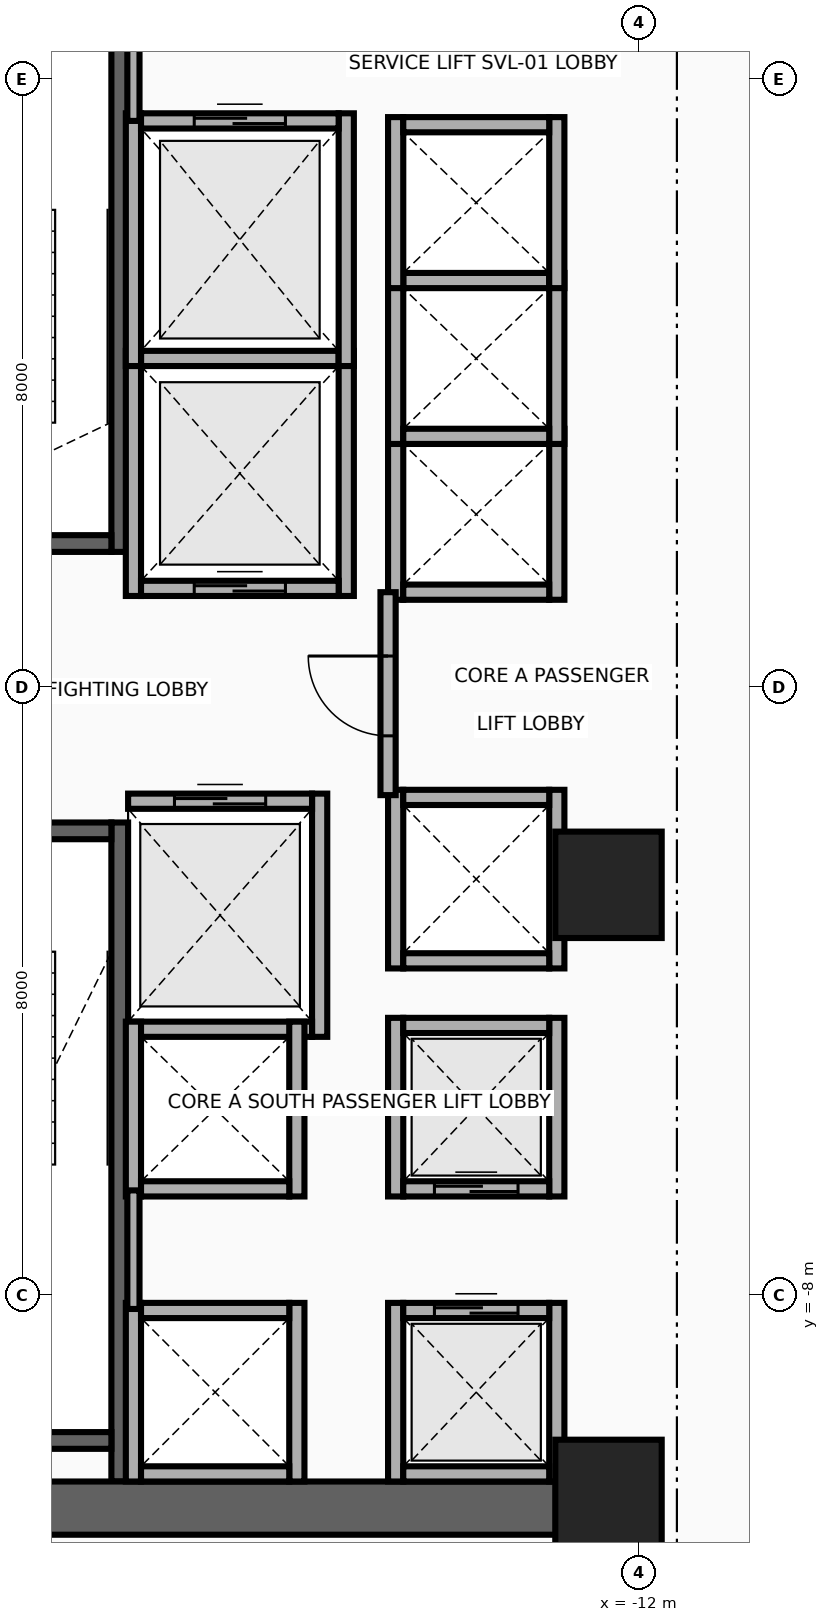
"""IFC4 building model, lengths in metres.
Left out: names, types, materials, properties, quantities, classifications, styles, units other than length and angle.
Written with IfcOpenShell. Run it as: python <this file> out.ifc"""

import sys

from ifc_helpers import new_model, si_unit, direction, frame, frame_2d, origin, origin_2d, place, context, subcontext, project, spatial, rectangle, extrude, source, transform, mapped, element, fill, save


model = new_model("IFC4")
c1 = context("Model", 3, precision=1e-05, world=origin(), true_north=direction((0.0, 1.0)))
c2 = subcontext(c1, "Body", "Model", "MODEL_VIEW")
j1 = project(units=[si_unit("LENGTHUNIT", "METRE"), si_unit("PLANEANGLEUNIT", "RADIAN")], contexts=[c1])
p1 = place(None, origin())
s1 = spatial("IfcSite", under=j1, at=p1, CompositionType="ELEMENT")
p2 = place(p1, origin())
s2 = spatial("IfcBuilding", under=s1, at=p2, CompositionType="ELEMENT")
p3 = place(p2, frame((0.0, 0.0, 40.8)))
s3 = spatial("IfcBuildingStorey", under=s2, at=p3, CompositionType="ELEMENT", Elevation=40.8)
p4 = place(p3, frame((-18.83, 1.78, 0.0), z_axis=(0.0, 0.0, 1.0), x_axis=(0.0, 1.0, 0.0)))
e1 = element("IfcWall", 1, at=p4, inside=s3, PredefinedType="SHEAR", context=c2, shape_type="SweptSolid", body=[
    extrude(rectangle(XDim=8.67, YDim=0.22, at=frame_2d((4.335, 0.0))), origin(), (0.0, 0.0, 1.0), 3.46),
])
p5 = place(p3, frame((-22.05, 1.89, 0.0), z_axis=(0.0, 0.0, 1.0), x_axis=(1.0, 0.0, 0.0)))
e2 = element("IfcWall", 2, at=p5, inside=s3, PredefinedType="SHEAR", context=c2, shape_type="SweptSolid", body=[
    extrude(rectangle(XDim=3.11, YDim=0.22, at=frame_2d((1.555, 0.0))), origin(), (0.0, 0.0, 1.0), 3.46),
])
p6 = place(p5, frame((1.0, 0.0, 0.0)))
e3 = element("IfcOpeningElement", 3, at=p6, cuts=e2, PredefinedType="OPENING", context=c2, shape_type="SweptSolid", body=[
    extrude(rectangle(XDim=1.1, YDim=2.15, at=frame_2d((0.55, 1.075))), frame((0.0, 0.125, 0.0), z_axis=(0.0, -1.0, 0.0), x_axis=(1.0, 0.0, 0.0)), (0.0, 0.0, 1.0), 0.25),
])
p7 = place(p3, frame((-18.83, -10.45, 0.0), z_axis=(0.0, 0.0, 1.0), x_axis=(0.0, 1.0, 0.0)))
e4 = element("IfcWall", 4, at=p7, inside=s3, PredefinedType="SHEAR", context=c2, shape_type="SweptSolid", body=[
    extrude(rectangle(XDim=8.67, YDim=0.22, at=frame_2d((4.335, 0.0))), origin(), (0.0, 0.0, 1.0), 3.46),
])
p8 = place(p3, frame((-22.05, -9.91, 0.0), z_axis=(0.0, 0.0, 1.0), x_axis=(1.0, 0.0, 0.0)))
e5 = element("IfcWall", 5, at=p8, inside=s3, PredefinedType="SHEAR", context=c2, shape_type="SweptSolid", body=[
    extrude(rectangle(XDim=3.11, YDim=0.22, at=frame_2d((1.555, 0.0))), origin(), (0.0, 0.0, 1.0), 3.46),
])
p9 = place(p3, frame((-22.05, -1.89, 0.0), z_axis=(0.0, 0.0, 1.0), x_axis=(1.0, 0.0, 0.0)))
e6 = element("IfcWall", 6, at=p9, inside=s3, PredefinedType="SHEAR", context=c2, shape_type="SweptSolid", body=[
    extrude(rectangle(XDim=3.11, YDim=0.22, at=frame_2d((1.555, 0.0))), origin(), (0.0, 0.0, 1.0), 3.46),
])
p10 = place(p9, frame((1.0, 0.0, 0.0)))
e7 = element("IfcOpeningElement", 7, at=p10, cuts=e6, PredefinedType="OPENING", context=c2, shape_type="SweptSolid", body=[
    extrude(rectangle(XDim=1.1, YDim=2.15, at=frame_2d((0.55, 1.075))), frame((0.0, 0.125, 0.0), z_axis=(0.0, -1.0, 0.0), x_axis=(1.0, 0.0, 0.0)), (0.0, 0.0, 1.0), 0.25),
])
p11 = place(p3, frame((-22.65, -10.8, 0.0), z_axis=(0.0, 0.0, 1.0), x_axis=(1.0, 0.0, 0.0)))
e8 = element("IfcWall", 8, at=p11, inside=s3, PredefinedType="SHEAR", context=c2, shape_type="SweptSolid", body=[
    extrude(rectangle(XDim=10.25, YDim=0.7, at=frame_2d((5.125, 0.0))), origin(), (0.0, 0.0, 1.0), 3.46),
])
m1 = source(origin(), c2, "Body", "SweptSolid", [
    extrude(rectangle(XDim=1.4, YDim=1.4, at=origin_2d()), origin(), (0.0, 0.0, 1.0), 3.7),
])
for number, where, z_axis, x_axis in (
    (9, (-12.4, -10.6, 0.0), (0.0, 0.0, 1.0), (1.0, 0.0, 0.0)),
    (10, (-12.4, -2.6, 0.0), (0.0, 0.0, 1.0), (1.0, 0.0, 0.0)),
):
    element("IfcColumn", number, at=place(p3, frame(where, z_axis=z_axis, x_axis=x_axis)), inside=s3, PredefinedType="COLUMN", context=c2, shape_type="MappedRepresentation", body=[
        mapped(m1, transform((0.0, 0.0, 0.0), x_axis=(1.0, 0.0, 0.0), y_axis=(0.0, 1.0, 0.0), z_axis=(0.0, 0.0, 1.0), scale=1.0)),
    ])
for number, where, z_axis, x_axis in (
    (11, (-18.65, 1.2, 0.0), (0.0, 0.0, 1.0), (0.0, 1.0, 0.0)),
    (12, (-15.85, 1.2, 0.0), (0.0, 0.0, 1.0), (0.0, 1.0, 0.0)),
):
    element("IfcWall", number, at=place(p3, frame(where, z_axis=z_axis, x_axis=x_axis)), inside=s3, PredefinedType="MOVABLE", context=c2, shape_type="SweptSolid", body=[
        extrude(rectangle(XDim=3.225, YDim=0.2, at=frame_2d((1.613, 0.0))), origin(), (0.0, 0.0, 1.0), 3.46),
    ])
p12 = place(p3, frame((-18.55, 1.3, 0.0), z_axis=(0.0, 0.0, 1.0), x_axis=(1.0, 0.0, 0.0)))
e13 = element("IfcWall", 13, at=p12, inside=s3, PredefinedType="MOVABLE", context=c2, shape_type="SweptSolid", body=[
    extrude(rectangle(XDim=2.6, YDim=0.2, at=frame_2d((1.3, 0.0))), origin(), (0.0, 0.0, 1.0), 3.46),
])
p13 = place(p12, frame((0.7, 0.0, 0.0)))
e14 = element("IfcOpeningElement", 14, at=p13, cuts=e13, PredefinedType="OPENING", context=c2, shape_type="SweptSolid", body=[
    extrude(rectangle(XDim=1.2, YDim=2.1, at=frame_2d((0.6, 1.05))), frame((0.0, 0.115, 0.0), z_axis=(0.0, -1.0, 0.0), x_axis=(1.0, 0.0, 0.0)), (0.0, 0.0, 1.0), 0.23),
])
p14 = place(p3, frame((-18.55, 4.325, 0.0), z_axis=(0.0, 0.0, 1.0), x_axis=(1.0, 0.0, 0.0)))
e15 = element("IfcWall", 15, at=p14, inside=s3, PredefinedType="MOVABLE", context=c2, shape_type="SweptSolid", body=[
    extrude(rectangle(XDim=2.6, YDim=0.2, at=frame_2d((1.3, 0.0))), origin(), (0.0, 0.0, 1.0), 3.46),
])
p15 = place(p3, frame((-16.2, -4.6, 0.0), z_axis=(0.0, 0.0, 1.0), x_axis=(0.0, 1.0, 0.0)))
e16 = element("IfcWall", 16, at=p15, inside=s3, PredefinedType="MOVABLE", context=c2, shape_type="SweptSolid", body=[
    extrude(rectangle(XDim=3.2, YDim=0.2, at=frame_2d((1.6, 0.0))), origin(), (0.0, 0.0, 1.0), 3.46),
])
p16 = place(p3, frame((-18.72, -4.5, 0.0), z_axis=(0.0, 0.0, 1.0), x_axis=(1.0, 0.0, 0.0)))
e17 = element("IfcWall", 17, at=p16, inside=s3, PredefinedType="MOVABLE", context=c2, shape_type="SweptSolid", body=[
    extrude(rectangle(XDim=2.42, YDim=0.2, at=frame_2d((1.21, 0.0))), origin(), (0.0, 0.0, 1.0), 3.46),
])
p17 = place(p3, frame((-18.72, -1.5, 0.0), z_axis=(0.0, 0.0, 1.0), x_axis=(1.0, 0.0, 0.0)))
e18 = element("IfcWall", 18, at=p17, inside=s3, PredefinedType="MOVABLE", context=c2, shape_type="SweptSolid", body=[
    extrude(rectangle(XDim=2.42, YDim=0.2, at=frame_2d((1.21, 0.0))), origin(), (0.0, 0.0, 1.0), 3.46),
])
p18 = place(p17, frame((0.61, 0.0, 0.0)))
e19 = element("IfcOpeningElement", 19, at=p18, cuts=e18, PredefinedType="OPENING", context=c2, shape_type="SweptSolid", body=[
    extrude(rectangle(XDim=1.2, YDim=2.1, at=frame_2d((0.6, 1.05))), frame((0.0, 0.115, 0.0), z_axis=(0.0, -1.0, 0.0), x_axis=(1.0, 0.0, 0.0)), (0.0, 0.0, 1.0), 0.23),
])
for number, where, z_axis, x_axis in (
    (20, (-18.65, 4.225, 0.0), (0.0, 0.0, 1.0), (0.0, 1.0, 0.0)),
    (21, (-15.85, 4.225, 0.0), (0.0, 0.0, 1.0), (0.0, 1.0, 0.0)),
):
    element("IfcWall", number, at=place(p3, frame(where, z_axis=z_axis, x_axis=x_axis)), inside=s3, PredefinedType="MOVABLE", context=c2, shape_type="SweptSolid", body=[
        extrude(rectangle(XDim=3.325, YDim=0.2, at=frame_2d((1.663, 0.0))), origin(), (0.0, 0.0, 1.0), 3.46),
    ])
p19 = place(p3, frame((-18.55, 7.45, 0.0), z_axis=(0.0, 0.0, 1.0), x_axis=(1.0, 0.0, 0.0)))
e22 = element("IfcWall", 22, at=p19, inside=s3, PredefinedType="MOVABLE", context=c2, shape_type="SweptSolid", body=[
    extrude(rectangle(XDim=2.6, YDim=0.2, at=frame_2d((1.3, 0.0))), origin(), (0.0, 0.0, 1.0), 3.46),
])
p20 = place(p19, frame((0.7, 0.0, 0.0)))
e23 = element("IfcOpeningElement", 23, at=p20, cuts=e22, PredefinedType="OPENING", context=c2, shape_type="SweptSolid", body=[
    extrude(rectangle(XDim=1.2, YDim=2.1, at=frame_2d((0.6, 1.05))), frame((0.0, 0.115, 0.0), z_axis=(0.0, -1.0, 0.0), x_axis=(1.0, 0.0, 0.0)), (0.0, 0.0, 1.0), 0.23),
])
for number, where, z_axis, x_axis in (
    (24, (-15.2, -10.45, 0.0), (0.0, 0.0, 1.0), (0.0, 1.0, 0.0)),
    (25, (-13.08, -10.45, 0.0), (0.0, 0.0, 1.0), (0.0, 1.0, 0.0)),
):
    element("IfcWall", number, at=place(p3, frame(where, z_axis=z_axis, x_axis=x_axis)), inside=s3, PredefinedType="MOVABLE", context=c2, shape_type="SweptSolid", body=[
        extrude(rectangle(XDim=2.35, YDim=0.2, at=frame_2d((1.175, 0.0))), origin(), (0.0, 0.0, 1.0), 2.583),
    ])
p21 = place(p3, frame((-15.1, -10.35, 0.0), z_axis=(0.0, 0.0, 1.0), x_axis=(1.0, 0.0, 0.0)))
e26 = element("IfcWall", 26, at=p21, inside=s3, PredefinedType="MOVABLE", context=c2, shape_type="SweptSolid", body=[
    extrude(rectangle(XDim=1.92, YDim=0.2, at=frame_2d((0.96, 0.0))), origin(), (0.0, 0.0, 1.0), 2.583),
])
p22 = place(p3, frame((-15.1, -8.2, 0.0), z_axis=(0.0, 0.0, 1.0), x_axis=(1.0, 0.0, 0.0)))
e27 = element("IfcWall", 27, at=p22, inside=s3, PredefinedType="MOVABLE", context=c2, shape_type="SweptSolid", body=[
    extrude(rectangle(XDim=1.92, YDim=0.2, at=frame_2d((0.96, 0.0))), origin(), (0.0, 0.0, 1.0), 3.46),
])
p23 = place(p22, frame((0.41, 0.0, 0.0)))
e28 = element("IfcOpeningElement", 28, at=p23, cuts=e27, PredefinedType="OPENING", context=c2, shape_type="SweptSolid", body=[
    extrude(rectangle(XDim=1.1, YDim=2.1, at=frame_2d((0.55, 1.05))), frame((0.0, 0.115, 0.0), z_axis=(0.0, -1.0, 0.0), x_axis=(1.0, 0.0, 0.0)), (0.0, 0.0, 1.0), 0.23),
])
for number, where, z_axis, x_axis in (
    (29, (-15.2, -6.7, 0.0), (0.0, 0.0, 1.0), (0.0, 1.0, 0.0)),
    (30, (-13.08, -6.7, 0.0), (0.0, 0.0, 1.0), (0.0, 1.0, 0.0)),
):
    element("IfcWall", number, at=place(p3, frame(where, z_axis=z_axis, x_axis=x_axis)), inside=s3, PredefinedType="MOVABLE", context=c2, shape_type="SweptSolid", body=[
        extrude(rectangle(XDim=2.35, YDim=0.2, at=frame_2d((1.175, 0.0))), origin(), (0.0, 0.0, 1.0), 3.46),
    ])
p24 = place(p3, frame((-15.1, -6.6, 0.0), z_axis=(0.0, 0.0, 1.0), x_axis=(1.0, 0.0, 0.0)))
e31 = element("IfcWall", 31, at=p24, inside=s3, PredefinedType="MOVABLE", context=c2, shape_type="SweptSolid", body=[
    extrude(rectangle(XDim=1.92, YDim=0.2, at=frame_2d((0.96, 0.0))), origin(), (0.0, 0.0, 1.0), 3.46),
])
p25 = place(p24, frame((0.41, 0.0, 0.0)))
e32 = element("IfcOpeningElement", 32, at=p25, cuts=e31, PredefinedType="OPENING", context=c2, shape_type="SweptSolid", body=[
    extrude(rectangle(XDim=1.1, YDim=2.1, at=frame_2d((0.55, 1.05))), frame((0.0, 0.115, 0.0), z_axis=(0.0, -1.0, 0.0), x_axis=(1.0, 0.0, 0.0)), (0.0, 0.0, 1.0), 0.23),
])
p26 = place(p3, frame((-15.1, -4.45, 0.0), z_axis=(0.0, 0.0, 1.0), x_axis=(1.0, 0.0, 0.0)))
e33 = element("IfcWall", 33, at=p26, inside=s3, PredefinedType="MOVABLE", context=c2, shape_type="SweptSolid", body=[
    extrude(rectangle(XDim=1.92, YDim=0.2, at=frame_2d((0.96, 0.0))), origin(), (0.0, 0.0, 1.0), 3.46),
])
for number, where, z_axis, x_axis in (
    (34, (-18.65, -10.45, 0.0), (0.0, 0.0, 1.0), (0.0, 1.0, 0.0)),
    (35, (-16.5, -10.45, 0.0), (0.0, 0.0, 1.0), (0.0, 1.0, 0.0)),
):
    element("IfcWall", number, at=place(p3, frame(where, z_axis=z_axis, x_axis=x_axis)), inside=s3, PredefinedType="MOVABLE", context=c2, shape_type="SweptSolid", body=[
        extrude(rectangle(XDim=2.35, YDim=0.2, at=frame_2d((1.175, 0.0))), origin(), (0.0, 0.0, 1.0), 2.583),
    ])
p27 = place(p3, frame((-18.55, -10.35, 0.0), z_axis=(0.0, 0.0, 1.0), x_axis=(1.0, 0.0, 0.0)))
e36 = element("IfcWall", 36, at=p27, inside=s3, PredefinedType="MOVABLE", context=c2, shape_type="SweptSolid", body=[
    extrude(rectangle(XDim=1.95, YDim=0.2, at=frame_2d((0.975, 0.0))), origin(), (0.0, 0.0, 1.0), 2.583),
])
p28 = place(p3, frame((-18.55, -8.2, 0.0), z_axis=(0.0, 0.0, 1.0), x_axis=(1.0, 0.0, 0.0)))
e37 = element("IfcWall", 37, at=p28, inside=s3, PredefinedType="MOVABLE", context=c2, shape_type="SweptSolid", body=[
    extrude(rectangle(XDim=1.95, YDim=0.2, at=frame_2d((0.975, 0.0))), origin(), (0.0, 0.0, 1.0), 3.46),
])
for number, where, z_axis, x_axis in (
    (38, (-15.2, 1.15, 0.0), (0.0, 0.0, 1.0), (0.0, 1.0, 0.0)),
    (39, (-13.08, 1.15, 0.0), (0.0, 0.0, 1.0), (0.0, 1.0, 0.0)),
):
    element("IfcWall", number, at=place(p3, frame(where, z_axis=z_axis, x_axis=x_axis)), inside=s3, PredefinedType="MOVABLE", context=c2, shape_type="SweptSolid", body=[
        extrude(rectangle(XDim=2.25, YDim=0.2, at=frame_2d((1.125, 0.0))), origin(), (0.0, 0.0, 1.0), 3.46),
    ])
p29 = place(p3, frame((-15.1, 1.25, 0.0), z_axis=(0.0, 0.0, 1.0), x_axis=(1.0, 0.0, 0.0)))
e40 = element("IfcWall", 40, at=p29, inside=s3, PredefinedType="MOVABLE", context=c2, shape_type="SweptSolid", body=[
    extrude(rectangle(XDim=1.92, YDim=0.2, at=frame_2d((0.96, 0.0))), origin(), (0.0, 0.0, 1.0), 3.46),
])
for number, where, z_axis, x_axis in (
    (41, (-15.2, 3.2, 0.0), (0.0, 0.0, 1.0), (0.0, 1.0, 0.0)),
    (42, (-13.08, 3.2, 0.0), (0.0, 0.0, 1.0), (0.0, 1.0, 0.0)),
):
    element("IfcWall", number, at=place(p3, frame(where, z_axis=z_axis, x_axis=x_axis)), inside=s3, PredefinedType="MOVABLE", context=c2, shape_type="SweptSolid", body=[
        extrude(rectangle(XDim=2.25, YDim=0.2, at=frame_2d((1.125, 0.0))), origin(), (0.0, 0.0, 1.0), 3.46),
    ])
for number, where, z_axis, x_axis in (
    (43, (-15.1, 3.3, 0.0), (0.0, 0.0, 1.0), (1.0, 0.0, 0.0)),
    (44, (-15.1, 5.35, 0.0), (0.0, 0.0, 1.0), (1.0, 0.0, 0.0)),
):
    element("IfcWall", number, at=place(p3, frame(where, z_axis=z_axis, x_axis=x_axis)), inside=s3, PredefinedType="MOVABLE", context=c2, shape_type="SweptSolid", body=[
        extrude(rectangle(XDim=1.92, YDim=0.2, at=frame_2d((0.96, 0.0))), origin(), (0.0, 0.0, 1.0), 3.46),
    ])
for number, where, z_axis, x_axis in (
    (45, (-15.2, 5.25, 0.0), (0.0, 0.0, 1.0), (0.0, 1.0, 0.0)),
    (46, (-13.08, 5.25, 0.0), (0.0, 0.0, 1.0), (0.0, 1.0, 0.0)),
):
    element("IfcWall", number, at=place(p3, frame(where, z_axis=z_axis, x_axis=x_axis)), inside=s3, PredefinedType="MOVABLE", context=c2, shape_type="SweptSolid", body=[
        extrude(rectangle(XDim=2.25, YDim=0.2, at=frame_2d((1.125, 0.0))), origin(), (0.0, 0.0, 1.0), 3.46),
    ])
p30 = place(p3, frame((-15.1, 7.4, 0.0), z_axis=(0.0, 0.0, 1.0), x_axis=(1.0, 0.0, 0.0)))
e47 = element("IfcWall", 47, at=p30, inside=s3, PredefinedType="MOVABLE", context=c2, shape_type="SweptSolid", body=[
    extrude(rectangle(XDim=1.92, YDim=0.2, at=frame_2d((0.96, 0.0))), origin(), (0.0, 0.0, 1.0), 3.46),
])
for number, where, z_axis, x_axis in (
    (48, (-18.65, -6.7, 0.0), (0.0, 0.0, 1.0), (0.0, 1.0, 0.0)),
    (49, (-16.5, -6.7, 0.0), (0.0, 0.0, 1.0), (0.0, 1.0, 0.0)),
):
    element("IfcWall", number, at=place(p3, frame(where, z_axis=z_axis, x_axis=x_axis)), inside=s3, PredefinedType="MOVABLE", context=c2, shape_type="SweptSolid", body=[
        extrude(rectangle(XDim=2.3, YDim=0.2, at=frame_2d((1.15, 0.0))), origin(), (0.0, 0.0, 1.0), 3.46),
    ])
p31 = place(p3, frame((-18.55, -6.6, 0.0), z_axis=(0.0, 0.0, 1.0), x_axis=(1.0, 0.0, 0.0)))
e50 = element("IfcWall", 50, at=p31, inside=s3, PredefinedType="MOVABLE", context=c2, shape_type="SweptSolid", body=[
    extrude(rectangle(XDim=1.95, YDim=0.2, at=frame_2d((0.975, 0.0))), origin(), (0.0, 0.0, 1.0), 3.46),
])
for number, where, z_axis, x_axis in (
    (51, (-15.2, -3.7, 0.0), (0.0, 0.0, 1.0), (0.0, 1.0, 0.0)),
    (52, (-13.08, -3.7, 0.0), (0.0, 0.0, 1.0), (0.0, 1.0, 0.0)),
):
    element("IfcWall", number, at=place(p3, frame(where, z_axis=z_axis, x_axis=x_axis)), inside=s3, PredefinedType="MOVABLE", context=c2, shape_type="SweptSolid", body=[
        extrude(rectangle(XDim=2.35, YDim=0.2, at=frame_2d((1.175, 0.0))), origin(), (0.0, 0.0, 1.0), 3.46),
    ])
for number, where, z_axis, x_axis in (
    (53, (-15.1, -3.6, 0.0), (0.0, 0.0, 1.0), (1.0, 0.0, 0.0)),
    (54, (-15.1, -1.45, 0.0), (0.0, 0.0, 1.0), (1.0, 0.0, 0.0)),
):
    element("IfcWall", number, at=place(p3, frame(where, z_axis=z_axis, x_axis=x_axis)), inside=s3, PredefinedType="MOVABLE", context=c2, shape_type="SweptSolid", body=[
        extrude(rectangle(XDim=1.92, YDim=0.2, at=frame_2d((0.96, 0.0))), origin(), (0.0, 0.0, 1.0), 3.46),
    ])
p32 = place(p3, frame((-15.3, -1.42, 0.0), z_axis=(0.0, 0.0, 1.0), x_axis=(0.0, 1.0, 0.0)))
e55 = element("IfcWall", 55, at=p32, inside=s3, PredefinedType="PARTITIONING", context=c2, shape_type="SweptSolid", body=[
    extrude(rectangle(XDim=2.67, YDim=0.2, at=frame_2d((1.335, 0.0))), origin(), (0.0, 0.0, 1.0), 3.46),
])
p33 = place(p32, frame((0.78, 0.0, 0.0)))
e56 = element("IfcOpeningElement", 56, at=p33, cuts=e55, PredefinedType="OPENING", context=c2, shape_type="SweptSolid", body=[
    extrude(rectangle(XDim=1.05, YDim=2.15, at=frame_2d((0.525, 1.075))), frame((0.0, 0.115, 0.0), z_axis=(0.0, -1.0, 0.0), x_axis=(1.0, 0.0, 0.0)), (0.0, 0.0, 1.0), 0.23),
])
p34 = place(p3, frame((-18.65, 7.45, 0.0), z_axis=(0.0, 0.0, 1.0), x_axis=(0.0, 1.0, 0.0)))
e57 = element("IfcWall", 57, at=p34, inside=s3, PredefinedType="PARTITIONING", context=c2, shape_type="SweptSolid", body=[
    extrude(rectangle(XDim=2.93, YDim=0.16, at=frame_2d((1.465, 0.0))), origin(), (0.0, 0.0, 1.0), 3.46),
])
p35 = place(p3, frame((-18.65, -8.18, 0.0), z_axis=(0.0, 0.0, 1.0), x_axis=(0.0, 1.0, 0.0)))
e58 = element("IfcWall", 58, at=p35, inside=s3, PredefinedType="PARTITIONING", context=c2, shape_type="SweptSolid", body=[
    extrude(rectangle(XDim=1.56, YDim=0.16, at=frame_2d((0.78, 0.0))), origin(), (0.0, 0.0, 1.0), 3.46),
])
p36 = place(p13, origin())
e59 = element("IfcDoor", 59, at=p36, inside=s3, OperationType="DOUBLE_DOOR_SLIDING", PredefinedType="DOOR", context=c2, shape_type="SweptSolid", body=[
    extrude(rectangle(XDim=1.2, YDim=2.1, at=frame_2d((0.6, 1.05))), frame((0.0, 0.025, 0.0), z_axis=(0.0, -1.0, 0.0), x_axis=(1.0, 0.0, 0.0)), (0.0, 0.0, 1.0), 0.05),
])
fill(e14, e59)
p37 = place(p18, origin())
e60 = element("IfcDoor", 60, at=p37, inside=s3, OperationType="DOUBLE_DOOR_SLIDING", PredefinedType="DOOR", context=c2, shape_type="SweptSolid", body=[
    extrude(rectangle(XDim=1.2, YDim=2.1, at=frame_2d((0.6, 1.05))), frame((0.0, 0.025, 0.0), z_axis=(0.0, -1.0, 0.0), x_axis=(1.0, 0.0, 0.0)), (0.0, 0.0, 1.0), 0.05),
])
fill(e19, e60)
p38 = place(p20, origin())
e61 = element("IfcDoor", 61, at=p38, inside=s3, OperationType="DOUBLE_DOOR_SLIDING", PredefinedType="DOOR", context=c2, shape_type="SweptSolid", body=[
    extrude(rectangle(XDim=1.2, YDim=2.1, at=frame_2d((0.6, 1.05))), frame((0.0, 0.025, 0.0), z_axis=(0.0, -1.0, 0.0), x_axis=(1.0, 0.0, 0.0)), (0.0, 0.0, 1.0), 0.05),
])
fill(e23, e61)
p39 = place(p23, origin())
e62 = element("IfcDoor", 62, at=p39, inside=s3, OperationType="DOUBLE_DOOR_SLIDING", PredefinedType="DOOR", context=c2, shape_type="SweptSolid", body=[
    extrude(rectangle(XDim=1.1, YDim=2.1, at=frame_2d((0.55, 1.05))), frame((0.0, 0.025, 0.0), z_axis=(0.0, -1.0, 0.0), x_axis=(1.0, 0.0, 0.0)), (0.0, 0.0, 1.0), 0.05),
])
fill(e28, e62)
p40 = place(p25, origin())
e63 = element("IfcDoor", 63, at=p40, inside=s3, OperationType="DOUBLE_DOOR_SLIDING", PredefinedType="DOOR", context=c2, shape_type="SweptSolid", body=[
    extrude(rectangle(XDim=1.1, YDim=2.1, at=frame_2d((0.55, 1.05))), frame((0.0, 0.025, 0.0), z_axis=(0.0, -1.0, 0.0), x_axis=(1.0, 0.0, 0.0)), (0.0, 0.0, 1.0), 0.05),
])
fill(e32, e63)
p41 = place(p33, origin())
e64 = element("IfcDoor", 64, at=p41, inside=s3, OperationType="SINGLE_SWING_RIGHT", PredefinedType="DOOR", context=c2, shape_type="SweptSolid", body=[
    extrude(rectangle(XDim=1.05, YDim=2.15, at=frame_2d((0.525, 1.075))), frame((0.0, 0.025, 0.0), z_axis=(0.0, -1.0, 0.0), x_axis=(1.0, 0.0, 0.0)), (0.0, 0.0, 1.0), 0.05),
])
fill(e56, e64)
save(model, sys.argv[1])
